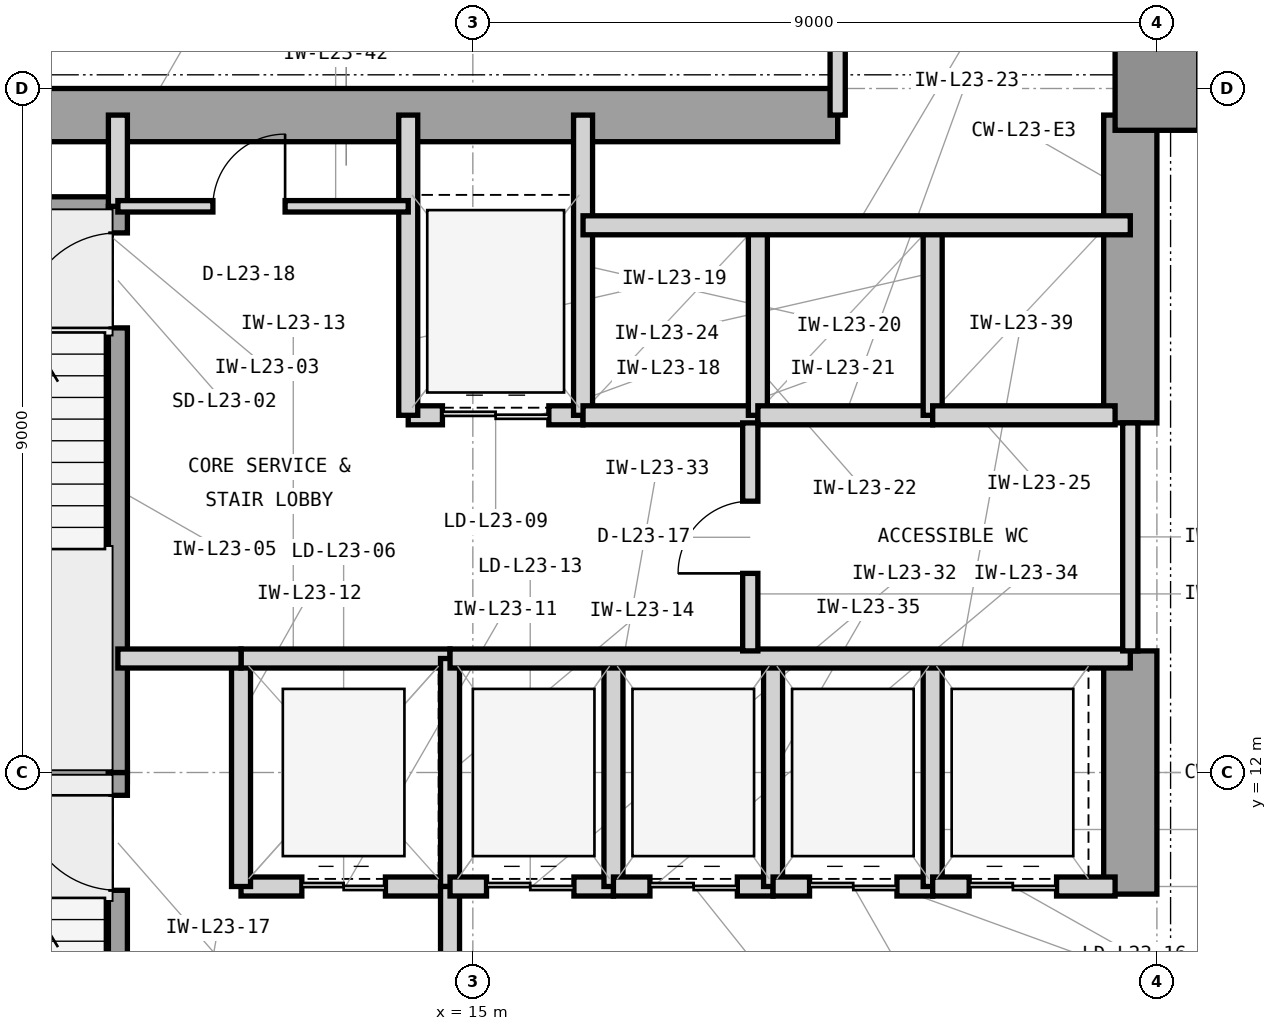
"""IFC4 building model, lengths in metres.
Left out: names, types, materials, properties, quantities, classifications, styles, units other than length and angle.
Written with IfcOpenShell. Run it as: python <this file> out.ifc"""

import sys

from ifc_helpers import new_model, si_unit, direction, frame, frame_2d, origin, origin_2d, place, context, subcontext, project, spatial, rectangle, extrude, element, fill, save


model = new_model("IFC4")
c1 = context("Model", 3, precision=1e-05, world=origin(), true_north=direction((0.0, 1.0)))
c2 = subcontext(c1, "Body", "Model", "MODEL_VIEW")
j1 = project(units=[si_unit("LENGTHUNIT", "METRE"), si_unit("PLANEANGLEUNIT", "RADIAN")], contexts=[c1])
p1 = place(None, origin())
s1 = spatial("IfcSite", under=j1, at=p1, CompositionType="ELEMENT")
p2 = place(p1, origin())
s2 = spatial("IfcBuilding", under=s1, at=p2, CompositionType="ELEMENT")
p3 = place(p2, frame((0.0, 0.0, 101.1)))
s3 = spatial("IfcBuildingStorey", under=s2, at=p3, CompositionType="ELEMENT", Elevation=101.1)
p4 = place(p3, frame((7.475, 20.65, 0.0), z_axis=(0.0, 0.0, 1.0), x_axis=(1.0, 0.0, 0.0)))
e1 = element("IfcWall", 1, at=p4, inside=s3, PredefinedType="SHEAR", context=c2, shape_type="SweptSolid", body=[
    extrude(rectangle(XDim=12.325, YDim=0.7, at=frame_2d((6.163, 0.0))), origin(), (0.0, 0.0, 1.0), 3.9),
])
p5 = place(p3, frame((23.65, 10.4, 0.0), z_axis=(0.0, 0.0, 1.0), x_axis=(0.0, 1.0, 0.0)))
e2 = element("IfcWall", 2, at=p5, inside=s3, PredefinedType="SHEAR", context=c2, shape_type="SweptSolid", body=[
    extrude(rectangle(XDim=3.2, YDim=0.7, at=frame_2d((1.6, 0.0))), origin(), (0.0, 0.0, 1.0), 3.9),
])
p6 = place(p3, frame((23.65, 16.6, 0.0), z_axis=(0.0, 0.0, 1.0), x_axis=(0.0, 1.0, 0.0)))
e3 = element("IfcWall", 3, at=p6, inside=s3, PredefinedType="SHEAR", context=c2, shape_type="SweptSolid", body=[
    extrude(rectangle(XDim=4.05, YDim=0.7, at=frame_2d((2.025, 0.0))), origin(), (0.0, 0.0, 1.0), 3.9),
])
p7 = place(p3, frame((24.0, 21.0, 0.0), z_axis=(0.0, 0.0, 1.0), x_axis=(1.0, 0.0, 0.0)))
e4 = element("IfcColumn", 4, at=p7, inside=s3, PredefinedType="COLUMN", context=c2, shape_type="SweptSolid", body=[
    extrude(rectangle(XDim=1.1, YDim=1.1, at=origin_2d()), origin(), (0.0, 0.0, 1.0), 3.9),
])
p8 = place(p3, frame((23.79, 21.0, 0.0), z_axis=(0.0, 0.0, 1.0), x_axis=(0.0, 1.0, 0.0)))
e5 = element("IfcWall", 5, at=p8, inside=s3, PredefinedType="STANDARD", context=c2, shape_type="SweptSolid", body=[
    extrude(rectangle(XDim=25.4, YDim=0.42, at=frame_2d((12.7, 0.0))), origin(), (0.0, 0.0, 1.0), 3.7),
])
p9 = place(p8, frame((11.45, 0.0, 0.85)))
e6 = element("IfcOpeningElement", 6, at=p9, cuts=e5, PredefinedType="OPENING", context=c2, shape_type="SweptSolid", body=[
    extrude(rectangle(XDim=2.5, YDim=2.25, at=frame_2d((1.25, 1.125))), frame((0.0, 0.22, 0.0), z_axis=(0.0, -1.0, 0.0), x_axis=(1.0, 0.0, 0.0)), (0.0, 0.0, 1.0), 0.44),
])
p10 = place(p8, frame((18.866, 0.0, 0.85)))
e7 = element("IfcOpeningElement", 7, at=p10, cuts=e5, PredefinedType="OPENING", context=c2, shape_type="SweptSolid", body=[
    extrude(rectangle(XDim=1.2, YDim=2.25, at=frame_2d((0.6, 1.125))), frame((0.0, 0.22, 0.0), z_axis=(0.0, -1.0, 0.0), x_axis=(1.0, 0.0, 0.0)), (0.0, 0.0, 1.0), 0.44),
])
p11 = place(p3, frame((6.35, 12.0, 0.0), z_axis=(0.0, 0.0, 1.0), x_axis=(1.0, 0.0, 0.0)))
e8 = element("IfcWall", 8, at=p11, inside=s3, PredefinedType="SHEAR", context=c2, shape_type="SweptSolid", body=[
    extrude(rectangle(XDim=4.105, YDim=0.25, at=frame_2d((2.052, 0.0))), origin(), (0.0, 0.0, 1.0), 3.9),
])
p12 = place(p3, frame((7.7, 19.45, 0.0), z_axis=(0.0, 0.0, 1.0), x_axis=(1.0, 0.0, 0.0)))
e9 = element("IfcWall", 9, at=p12, inside=s3, PredefinedType="SHEAR", context=c2, shape_type="SweptSolid", body=[
    extrude(rectangle(XDim=2.755, YDim=0.25, at=frame_2d((1.377, 0.0))), origin(), (0.0, 0.0, 1.0), 3.9),
])
p13 = place(p3, frame((10.33, 4.55, 0.0), z_axis=(0.0, 0.0, 1.0), x_axis=(0.0, 1.0, 0.0)))
e10 = element("IfcWall", 10, at=p13, inside=s3, PredefinedType="SHEAR", context=c2, shape_type="SweptSolid", body=[
    extrude(rectangle(XDim=7.45, YDim=0.25, at=frame_2d((3.725, 0.0))), origin(), (0.0, 0.0, 1.0), 3.9),
])
p14 = place(p13, frame((5.9, 0.0, 0.0)))
e11 = element("IfcOpeningElement", 11, at=p14, cuts=e10, PredefinedType="OPENING", context=c2, shape_type="SweptSolid", body=[
    extrude(rectangle(XDim=1.25, YDim=2.2, at=frame_2d((0.625, 1.1))), frame((0.0, 0.135, 0.0), z_axis=(0.0, -1.0, 0.0), x_axis=(1.0, 0.0, 0.0)), (0.0, 0.0, 1.0), 0.27),
])
p15 = place(p3, frame((10.33, 12.0, 0.0), z_axis=(0.0, 0.0, 1.0), x_axis=(0.0, 1.0, 0.0)))
e12 = element("IfcWall", 12, at=p15, inside=s3, PredefinedType="SHEAR", context=c2, shape_type="SweptSolid", body=[
    extrude(rectangle(XDim=7.45, YDim=0.25, at=frame_2d((3.725, 0.0))), origin(), (0.0, 0.0, 1.0), 3.9),
])
p16 = place(p15, frame((5.85, 0.0, 0.0)))
e13 = element("IfcOpeningElement", 13, at=p16, cuts=e12, PredefinedType="OPENING", context=c2, shape_type="SweptSolid", body=[
    extrude(rectangle(XDim=1.25, YDim=2.2, at=frame_2d((0.625, 1.1))), frame((0.0, 0.135, 0.0), z_axis=(0.0, -1.0, 0.0), x_axis=(1.0, 0.0, 0.0)), (0.0, 0.0, 1.0), 0.27),
])
p17 = place(p3, frame((10.33, 19.45, 0.0), z_axis=(0.0, 0.0, 1.0), x_axis=(0.0, 1.0, 0.0)))
e14 = element("IfcWall", 14, at=p17, inside=s3, PredefinedType="PARTITIONING", context=c2, shape_type="SweptSolid", body=[
    extrude(rectangle(XDim=1.2, YDim=0.25, at=frame_2d((0.6, 0.0))), origin(), (0.0, 0.0, 1.0), 2.917),
])
p18 = place(p3, frame((11.95, 10.5, 0.0), z_axis=(0.0, 0.0, 1.0), x_axis=(1.0, 0.0, 0.0)))
e15 = element("IfcWall", 15, at=p18, inside=s3, PredefinedType="PARTITIONING", context=c2, shape_type="SweptSolid", body=[
    extrude(rectangle(XDim=2.75, YDim=0.25, at=frame_2d((1.375, 0.0))), origin(), (0.0, 0.0, 1.0), 3.227),
])
p19 = place(p18, frame((0.8, 0.0, 0.0)))
e16 = element("IfcOpeningElement", 16, at=p19, cuts=e15, PredefinedType="OPENING", context=c2, shape_type="SweptSolid", body=[
    extrude(rectangle(XDim=1.1, YDim=2.25, at=frame_2d((0.55, 1.125))), frame((0.0, 0.135, 0.0), z_axis=(0.0, -1.0, 0.0), x_axis=(1.0, 0.0, 0.0)), (0.0, 0.0, 1.0), 0.27),
])
p20 = place(p3, frame((11.95, 10.5, 0.0), z_axis=(0.0, 0.0, 1.0), x_axis=(0.0, 1.0, 0.0)))
e17 = element("IfcWall", 17, at=p20, inside=s3, PredefinedType="PARTITIONING", context=c2, shape_type="SweptSolid", body=[
    extrude(rectangle(XDim=3.0, YDim=0.25, at=frame_2d((1.5, 0.0))), origin(), (0.0, 0.0, 1.0), 3.69),
])
p21 = place(p3, frame((11.95, 13.5, 0.0), z_axis=(0.0, 0.0, 1.0), x_axis=(1.0, 0.0, 0.0)))
e18 = element("IfcWall", 18, at=p21, inside=s3, PredefinedType="PARTITIONING", context=c2, shape_type="SweptSolid", body=[
    extrude(rectangle(XDim=2.75, YDim=0.25, at=frame_2d((1.375, 0.0))), origin(), (0.0, 0.0, 1.0), 3.227),
])
p22 = place(p3, frame((14.7, 10.5, 0.0), z_axis=(0.0, 0.0, 1.0), x_axis=(0.0, 1.0, 0.0)))
e19 = element("IfcWall", 19, at=p22, inside=s3, PredefinedType="PARTITIONING", context=c2, shape_type="SweptSolid", body=[
    extrude(rectangle(XDim=3.0, YDim=0.25, at=frame_2d((1.5, 0.0))), origin(), (0.0, 0.0, 1.0), 3.69),
])
p23 = place(p3, frame((14.7, 6.7, 0.0), z_axis=(0.0, 0.0, 1.0), x_axis=(0.0, 1.0, 0.0)))
e20 = element("IfcWall", 20, at=p23, inside=s3, PredefinedType="PARTITIONING", context=c2, shape_type="SweptSolid", body=[
    extrude(rectangle(XDim=3.8, YDim=0.25, at=frame_2d((1.9, 0.0))), origin(), (0.0, 0.0, 1.0), 3.69),
])
p24 = place(p23, frame((1.3, 0.0, 0.0)))
e21 = element("IfcOpeningElement", 21, at=p24, cuts=e20, PredefinedType="OPENING", context=c2, shape_type="SweptSolid", body=[
    extrude(rectangle(XDim=1.2, YDim=2.2, at=frame_2d((0.6, 1.1))), frame((0.0, 0.135, 0.0), z_axis=(0.0, -1.0, 0.0), x_axis=(1.0, 0.0, 0.0)), (0.0, 0.0, 1.0), 0.27),
])
p25 = place(p3, frame((10.33, 13.5, 0.0), z_axis=(0.0, 0.0, 1.0), x_axis=(1.0, 0.0, 0.0)))
e22 = element("IfcWall", 22, at=p25, inside=s3, PredefinedType="PARTITIONING", context=c2, shape_type="SweptSolid", body=[
    extrude(rectangle(XDim=1.62, YDim=0.25, at=frame_2d((0.81, 0.0))), origin(), (0.0, 0.0, 1.0), 3.227),
])
p26 = place(p3, frame((14.15, 16.7, 0.0), z_axis=(0.0, 0.0, 1.0), x_axis=(1.0, 0.0, 0.0)))
e23 = element("IfcWall", 23, at=p26, inside=s3, PredefinedType="PARTITIONING", context=c2, shape_type="SweptSolid", body=[
    extrude(rectangle(XDim=2.3, YDim=0.25, at=frame_2d((1.15, 0.0))), origin(), (0.0, 0.0, 1.0), 3.227),
])
p27 = place(p26, frame((0.45, 0.0, 0.0)))
e24 = element("IfcOpeningElement", 24, at=p27, cuts=e23, PredefinedType="OPENING", context=c2, shape_type="SweptSolid", body=[
    extrude(rectangle(XDim=1.4, YDim=2.35, at=frame_2d((0.7, 1.175))), frame((0.0, 0.135, 0.0), z_axis=(0.0, -1.0, 0.0), x_axis=(1.0, 0.0, 0.0)), (0.0, 0.0, 1.0), 0.27),
])
for number, where, z_axis, x_axis in (
    (25, (14.15, 16.7, 0.0), (0.0, 0.0, 1.0), (0.0, 1.0, 0.0)),
    (26, (16.45, 16.7, 0.0), (0.0, 0.0, 1.0), (0.0, 1.0, 0.0)),
):
    element("IfcWall", number, at=place(p3, frame(where, z_axis=z_axis, x_axis=x_axis)), inside=s3, PredefinedType="PARTITIONING", context=c2, shape_type="SweptSolid", body=[
        extrude(rectangle(XDim=3.95, YDim=0.25, at=frame_2d((1.975, 0.0))), origin(), (0.0, 0.0, 1.0), 3.69),
    ])
p28 = place(p3, frame((16.45, 16.7, 0.0), z_axis=(0.0, 0.0, 1.0), x_axis=(1.0, 0.0, 0.0)))
e27 = element("IfcWall", 27, at=p28, inside=s3, PredefinedType="PARTITIONING", context=c2, shape_type="SweptSolid", body=[
    extrude(rectangle(XDim=2.3, YDim=0.25, at=frame_2d((1.15, 0.0))), origin(), (0.0, 0.0, 1.0), 3.227),
])
p29 = place(p3, frame((18.75, 16.7, 0.0), z_axis=(0.0, 0.0, 1.0), x_axis=(0.0, 1.0, 0.0)))
e28 = element("IfcWall", 28, at=p29, inside=s3, PredefinedType="PARTITIONING", context=c2, shape_type="SweptSolid", body=[
    extrude(rectangle(XDim=2.5, YDim=0.25, at=frame_2d((1.25, 0.0))), origin(), (0.0, 0.0, 1.0), 3.69),
])
p30 = place(p3, frame((18.75, 16.7, 0.0), z_axis=(0.0, 0.0, 1.0), x_axis=(1.0, 0.0, 0.0)))
e29 = element("IfcWall", 29, at=p30, inside=s3, PredefinedType="PARTITIONING", context=c2, shape_type="SweptSolid", body=[
    extrude(rectangle(XDim=2.3, YDim=0.25, at=frame_2d((1.15, 0.0))), origin(), (0.0, 0.0, 1.0), 3.227),
])
p31 = place(p3, frame((21.05, 16.7, 0.0), z_axis=(0.0, 0.0, 1.0), x_axis=(0.0, 1.0, 0.0)))
e30 = element("IfcWall", 30, at=p31, inside=s3, PredefinedType="PARTITIONING", context=c2, shape_type="SweptSolid", body=[
    extrude(rectangle(XDim=2.5, YDim=0.25, at=frame_2d((1.25, 0.0))), origin(), (0.0, 0.0, 1.0), 3.69),
])
p32 = place(p3, frame((21.05, 16.7, 0.0), z_axis=(0.0, 0.0, 1.0), x_axis=(1.0, 0.0, 0.0)))
e31 = element("IfcWall", 31, at=p32, inside=s3, PredefinedType="PARTITIONING", context=c2, shape_type="SweptSolid", body=[
    extrude(rectangle(XDim=2.4, YDim=0.25, at=frame_2d((1.2, 0.0))), origin(), (0.0, 0.0, 1.0), 3.227),
])
p33 = place(p3, frame((16.45, 19.2, 0.0), z_axis=(0.0, 0.0, 1.0), x_axis=(1.0, 0.0, 0.0)))
e32 = element("IfcWall", 32, at=p33, inside=s3, PredefinedType="PARTITIONING", context=c2, shape_type="SweptSolid", body=[
    extrude(rectangle(XDim=7.2, YDim=0.25, at=frame_2d((3.6, 0.0))), origin(), (0.0, 0.0, 1.0), 3.69),
])
p34 = place(p3, frame((14.7, 10.5, 0.0), z_axis=(0.0, 0.0, 1.0), x_axis=(1.0, 0.0, 0.0)))
e33 = element("IfcWall", 33, at=p34, inside=s3, PredefinedType="PARTITIONING", context=c2, shape_type="SweptSolid", body=[
    extrude(rectangle(XDim=2.15, YDim=0.25, at=frame_2d((1.075, 0.0))), origin(), (0.0, 0.0, 1.0), 3.227),
])
p35 = place(p34, frame((0.48, 0.0, 0.0)))
e34 = element("IfcOpeningElement", 34, at=p35, cuts=e33, PredefinedType="OPENING", context=c2, shape_type="SweptSolid", body=[
    extrude(rectangle(XDim=1.15, YDim=2.25, at=frame_2d((0.575, 1.125))), frame((0.0, 0.135, 0.0), z_axis=(0.0, -1.0, 0.0), x_axis=(1.0, 0.0, 0.0)), (0.0, 0.0, 1.0), 0.27),
])
p36 = place(p3, frame((16.85, 10.5, 0.0), z_axis=(0.0, 0.0, 1.0), x_axis=(0.0, 1.0, 0.0)))
e35 = element("IfcWall", 35, at=p36, inside=s3, PredefinedType="PARTITIONING", context=c2, shape_type="SweptSolid", body=[
    extrude(rectangle(XDim=3.0, YDim=0.25, at=frame_2d((1.5, 0.0))), origin(), (0.0, 0.0, 1.0), 3.69),
])
p37 = place(p3, frame((16.85, 10.5, 0.0), z_axis=(0.0, 0.0, 1.0), x_axis=(1.0, 0.0, 0.0)))
e36 = element("IfcWall", 36, at=p37, inside=s3, PredefinedType="PARTITIONING", context=c2, shape_type="SweptSolid", body=[
    extrude(rectangle(XDim=2.1, YDim=0.25, at=frame_2d((1.05, 0.0))), origin(), (0.0, 0.0, 1.0), 3.227),
])
p38 = place(p37, frame((0.48, 0.0, 0.0)))
e37 = element("IfcOpeningElement", 37, at=p38, cuts=e36, PredefinedType="OPENING", context=c2, shape_type="SweptSolid", body=[
    extrude(rectangle(XDim=1.15, YDim=2.25, at=frame_2d((0.575, 1.125))), frame((0.0, 0.135, 0.0), z_axis=(0.0, -1.0, 0.0), x_axis=(1.0, 0.0, 0.0)), (0.0, 0.0, 1.0), 0.27),
])
p39 = place(p3, frame((18.95, 10.5, 0.0), z_axis=(0.0, 0.0, 1.0), x_axis=(0.0, 1.0, 0.0)))
e38 = element("IfcWall", 38, at=p39, inside=s3, PredefinedType="PARTITIONING", context=c2, shape_type="SweptSolid", body=[
    extrude(rectangle(XDim=3.0, YDim=0.25, at=frame_2d((1.5, 0.0))), origin(), (0.0, 0.0, 1.0), 3.69),
])
p40 = place(p3, frame((18.95, 10.5, 0.0), z_axis=(0.0, 0.0, 1.0), x_axis=(1.0, 0.0, 0.0)))
e39 = element("IfcWall", 39, at=p40, inside=s3, PredefinedType="PARTITIONING", context=c2, shape_type="SweptSolid", body=[
    extrude(rectangle(XDim=2.1, YDim=0.25, at=frame_2d((1.05, 0.0))), origin(), (0.0, 0.0, 1.0), 3.227),
])
p41 = place(p40, frame((0.48, 0.0, 0.0)))
e40 = element("IfcOpeningElement", 40, at=p41, cuts=e39, PredefinedType="OPENING", context=c2, shape_type="SweptSolid", body=[
    extrude(rectangle(XDim=1.15, YDim=2.25, at=frame_2d((0.575, 1.125))), frame((0.0, 0.135, 0.0), z_axis=(0.0, -1.0, 0.0), x_axis=(1.0, 0.0, 0.0)), (0.0, 0.0, 1.0), 0.27),
])
p42 = place(p3, frame((21.05, 10.5, 0.0), z_axis=(0.0, 0.0, 1.0), x_axis=(0.0, 1.0, 0.0)))
e41 = element("IfcWall", 41, at=p42, inside=s3, PredefinedType="PARTITIONING", context=c2, shape_type="SweptSolid", body=[
    extrude(rectangle(XDim=3.0, YDim=0.25, at=frame_2d((1.5, 0.0))), origin(), (0.0, 0.0, 1.0), 3.69),
])
p43 = place(p3, frame((21.05, 10.5, 0.0), z_axis=(0.0, 0.0, 1.0), x_axis=(1.0, 0.0, 0.0)))
e42 = element("IfcWall", 42, at=p43, inside=s3, PredefinedType="PARTITIONING", context=c2, shape_type="SweptSolid", body=[
    extrude(rectangle(XDim=2.4, YDim=0.25, at=frame_2d((1.2, 0.0))), origin(), (0.0, 0.0, 1.0), 3.227),
])
p44 = place(p43, frame((0.48, 0.0, 0.0)))
e43 = element("IfcOpeningElement", 43, at=p44, cuts=e42, PredefinedType="OPENING", context=c2, shape_type="SweptSolid", body=[
    extrude(rectangle(XDim=1.15, YDim=2.25, at=frame_2d((0.575, 1.125))), frame((0.0, 0.135, 0.0), z_axis=(0.0, -1.0, 0.0), x_axis=(1.0, 0.0, 0.0)), (0.0, 0.0, 1.0), 0.27),
])
p45 = place(p3, frame((14.7, 13.5, 0.0), z_axis=(0.0, 0.0, 1.0), x_axis=(1.0, 0.0, 0.0)))
e44 = element("IfcWall", 44, at=p45, inside=s3, PredefinedType="PARTITIONING", context=c2, shape_type="SweptSolid", body=[
    extrude(rectangle(XDim=8.95, YDim=0.25, at=frame_2d((4.475, 0.0))), origin(), (0.0, 0.0, 1.0), 3.227),
])
p46 = place(p3, frame((18.65, 13.6, 0.0), z_axis=(0.0, 0.0, 1.0), x_axis=(0.0, 1.0, 0.0)))
e45 = element("IfcWall", 45, at=p46, inside=s3, PredefinedType="PARTITIONING", context=c2, shape_type="SweptSolid", body=[
    extrude(rectangle(XDim=3.0, YDim=0.2, at=frame_2d((1.5, 0.0))), origin(), (0.0, 0.0, 1.0), 3.69),
])
p47 = place(p46, frame((1.02, 0.0, 0.0)))
e46 = element("IfcOpeningElement", 46, at=p47, cuts=e45, PredefinedType="OPENING", context=c2, shape_type="SweptSolid", body=[
    extrude(rectangle(XDim=0.95, YDim=2.1, at=frame_2d((0.475, 1.05))), frame((0.0, 0.11, 0.0), z_axis=(0.0, -1.0, 0.0), x_axis=(1.0, 0.0, 0.0)), (0.0, 0.0, 1.0), 0.22),
])
p48 = place(p3, frame((23.65, 13.6, 0.0), z_axis=(0.0, 0.0, 1.0), x_axis=(0.0, 1.0, 0.0)))
e47 = element("IfcWall", 47, at=p48, inside=s3, PredefinedType="PARTITIONING", context=c2, shape_type="SweptSolid", body=[
    extrude(rectangle(XDim=3.0, YDim=0.2, at=frame_2d((1.5, 0.0))), origin(), (0.0, 0.0, 1.0), 3.69),
])
p49 = place(p3, frame((10.33, 19.45, 0.0), z_axis=(0.0, 0.0, 1.0), x_axis=(1.0, 0.0, 0.0)))
e48 = element("IfcWall", 48, at=p49, inside=s3, PredefinedType="PARTITIONING", context=c2, shape_type="SweptSolid", body=[
    extrude(rectangle(XDim=3.82, YDim=0.15, at=frame_2d((1.91, 0.0))), origin(), (0.0, 0.0, 1.0), 3.69),
])
p50 = place(p49, frame((1.25, 0.0, 0.0)))
e49 = element("IfcOpeningElement", 49, at=p50, cuts=e48, PredefinedType="OPENING", context=c2, shape_type="SweptSolid", body=[
    extrude(rectangle(XDim=0.95, YDim=2.1, at=frame_2d((0.475, 1.05))), frame((0.0, 0.085, 0.0), z_axis=(0.0, -1.0, 0.0), x_axis=(1.0, 0.0, 0.0)), (0.0, 0.0, 1.0), 0.17),
])
p51 = place(p3, frame((19.8, 20.65, 0.0), z_axis=(0.0, 0.0, 1.0), x_axis=(0.0, 1.0, 0.0)))
e50 = element("IfcWall", 50, at=p51, inside=s3, PredefinedType="PARTITIONING", context=c2, shape_type="SweptSolid", body=[
    extrude(rectangle(XDim=6.15, YDim=0.2, at=frame_2d((3.075, 0.0))), origin(), (0.0, 0.0, 1.0), 3.69),
])
p52 = place(p14, origin())
e51 = element("IfcDoor", 51, at=p52, inside=s3, OperationType="SINGLE_SWING_RIGHT", PredefinedType="DOOR", context=c2, shape_type="SweptSolid", body=[
    extrude(rectangle(XDim=1.25, YDim=2.2, at=frame_2d((0.625, 1.1))), frame((0.0, 0.025, 0.0), z_axis=(0.0, -1.0, 0.0), x_axis=(1.0, 0.0, 0.0)), (0.0, 0.0, 1.0), 0.05),
])
fill(e11, e51)
p53 = place(p16, origin())
e52 = element("IfcDoor", 52, at=p53, inside=s3, OperationType="SINGLE_SWING_LEFT", PredefinedType="DOOR", context=c2, shape_type="SweptSolid", body=[
    extrude(rectangle(XDim=1.25, YDim=2.2, at=frame_2d((0.625, 1.1))), frame((0.0, 0.025, 0.0), z_axis=(0.0, -1.0, 0.0), x_axis=(1.0, 0.0, 0.0)), (0.0, 0.0, 1.0), 0.05),
])
fill(e13, e52)
p54 = place(p19, origin())
e53 = element("IfcDoor", 53, at=p54, inside=s3, OperationType="DOUBLE_DOOR_SLIDING", PredefinedType="DOOR", context=c2, shape_type="SweptSolid", body=[
    extrude(rectangle(XDim=1.1, YDim=2.25, at=frame_2d((0.55, 1.125))), frame((0.0, 0.025, 0.0), z_axis=(0.0, -1.0, 0.0), x_axis=(1.0, 0.0, 0.0)), (0.0, 0.0, 1.0), 0.05),
])
fill(e16, e53)
p55 = place(p27, origin())
e54 = element("IfcDoor", 54, at=p55, inside=s3, OperationType="DOUBLE_DOOR_SLIDING", PredefinedType="DOOR", context=c2, shape_type="SweptSolid", body=[
    extrude(rectangle(XDim=1.4, YDim=2.35, at=frame_2d((0.7, 1.175))), frame((0.0, 0.025, 0.0), z_axis=(0.0, -1.0, 0.0), x_axis=(1.0, 0.0, 0.0)), (0.0, 0.0, 1.0), 0.05),
])
fill(e24, e54)
p56 = place(p35, origin())
e55 = element("IfcDoor", 55, at=p56, inside=s3, OperationType="DOUBLE_DOOR_SLIDING", PredefinedType="DOOR", context=c2, shape_type="SweptSolid", body=[
    extrude(rectangle(XDim=1.15, YDim=2.25, at=frame_2d((0.575, 1.125))), frame((0.0, 0.025, 0.0), z_axis=(0.0, -1.0, 0.0), x_axis=(1.0, 0.0, 0.0)), (0.0, 0.0, 1.0), 0.05),
])
fill(e34, e55)
p57 = place(p38, origin())
e56 = element("IfcDoor", 56, at=p57, inside=s3, OperationType="DOUBLE_DOOR_SLIDING", PredefinedType="DOOR", context=c2, shape_type="SweptSolid", body=[
    extrude(rectangle(XDim=1.15, YDim=2.25, at=frame_2d((0.575, 1.125))), frame((0.0, 0.025, 0.0), z_axis=(0.0, -1.0, 0.0), x_axis=(1.0, 0.0, 0.0)), (0.0, 0.0, 1.0), 0.05),
])
fill(e37, e56)
p58 = place(p41, origin())
e57 = element("IfcDoor", 57, at=p58, inside=s3, OperationType="DOUBLE_DOOR_SLIDING", PredefinedType="DOOR", context=c2, shape_type="SweptSolid", body=[
    extrude(rectangle(XDim=1.15, YDim=2.25, at=frame_2d((0.575, 1.125))), frame((0.0, 0.025, 0.0), z_axis=(0.0, -1.0, 0.0), x_axis=(1.0, 0.0, 0.0)), (0.0, 0.0, 1.0), 0.05),
])
fill(e40, e57)
p59 = place(p44, origin())
e58 = element("IfcDoor", 58, at=p59, inside=s3, OperationType="DOUBLE_DOOR_SLIDING", PredefinedType="DOOR", context=c2, shape_type="SweptSolid", body=[
    extrude(rectangle(XDim=1.15, YDim=2.25, at=frame_2d((0.575, 1.125))), frame((0.0, 0.025, 0.0), z_axis=(0.0, -1.0, 0.0), x_axis=(1.0, 0.0, 0.0)), (0.0, 0.0, 1.0), 0.05),
])
fill(e43, e58)
p60 = place(p47, origin())
e59 = element("IfcDoor", 59, at=p60, inside=s3, OperationType="SINGLE_SWING_LEFT", PredefinedType="DOOR", context=c2, shape_type="SweptSolid", body=[
    extrude(rectangle(XDim=0.95, YDim=2.1, at=frame_2d((0.475, 1.05))), frame((0.0, 0.025, 0.0), z_axis=(0.0, -1.0, 0.0), x_axis=(1.0, 0.0, 0.0)), (0.0, 0.0, 1.0), 0.05),
])
fill(e46, e59)
p61 = place(p50, origin())
e60 = element("IfcDoor", 60, at=p61, inside=s3, OperationType="SINGLE_SWING_RIGHT", PredefinedType="DOOR", context=c2, shape_type="SweptSolid", body=[
    extrude(rectangle(XDim=0.95, YDim=2.1, at=frame_2d((0.475, 1.05))), frame((0.0, 0.025, 0.0), z_axis=(0.0, -1.0, 0.0), x_axis=(1.0, 0.0, 0.0)), (0.0, 0.0, 1.0), 0.05),
])
fill(e49, e60)
save(model, sys.argv[1])
